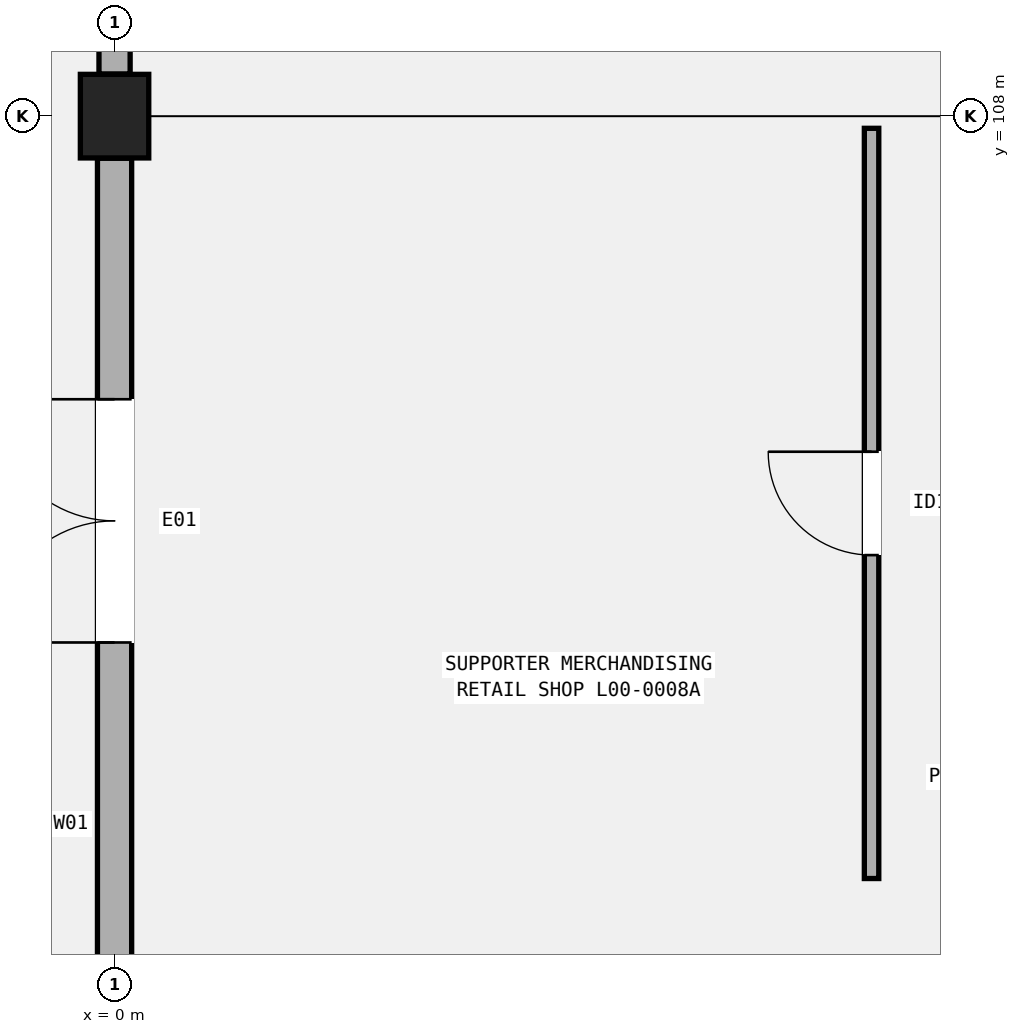
"""IFC4 building model, lengths in metres.
Left out: names, types, materials, properties, quantities, classifications, styles, units other than length and angle.
Written with IfcOpenShell. Run it as: python <this file> out.ifc"""

import sys

from ifc_helpers import new_model, si_unit, direction, frame, frame_2d, origin, origin_2d, place, context, subcontext, project, spatial, rectangle, extrude, element, fill, save


model = new_model("IFC4")
c1 = context("Model", 3, precision=1e-05, world=origin(), true_north=direction((0.0, 1.0)))
c2 = subcontext(c1, "Body", "Model", "MODEL_VIEW")
j1 = project(units=[si_unit("LENGTHUNIT", "METRE"), si_unit("PLANEANGLEUNIT", "RADIAN")], contexts=[c1])
p1 = place(None, origin())
s1 = spatial("IfcSite", under=j1, at=p1, CompositionType="ELEMENT")
p2 = place(p1, origin())
s2 = spatial("IfcBuilding", under=s1, at=p2, CompositionType="ELEMENT")
p3 = place(p2, origin())
s3 = spatial("IfcBuildingStorey", under=s2, at=p3, CompositionType="ELEMENT", Elevation=0.0)
p4 = place(p3, frame((0.0, 108.0, 0.0), z_axis=(0.0, 0.0, 1.0), x_axis=(1.0, 0.0, 0.0)))
e1 = element("IfcColumn", 1, at=p4, inside=s3, PredefinedType="COLUMN", context=c2, shape_type="SweptSolid", body=[
    extrude(rectangle(XDim=0.9, YDim=1.1, at=origin_2d()), origin(), (0.0, 0.0, 1.0), 5.4),
])
p5 = place(p3, frame((0.0, 96.604, 0.0), z_axis=(0.0, 0.0, 1.0), x_axis=(0.0, 1.0, 0.0)))
e2 = element("IfcWall", 2, at=p5, inside=s3, PredefinedType="SOLIDWALL", context=c2, shape_type="SweptSolid", body=[
    extrude(rectangle(XDim=10.842, YDim=0.45, at=frame_2d((5.421, 0.0))), origin(), (0.0, 0.0, 1.0), 4.44),
])
p6 = place(p5, frame((4.471, 0.0, 0.0)))
e3 = element("IfcOpeningElement", 3, at=p6, cuts=e2, PredefinedType="OPENING", context=c2, shape_type="SweptSolid", body=[
    extrude(rectangle(XDim=3.2, YDim=2.6, at=frame_2d((1.6, 1.3))), frame((0.0, 0.235, 0.0), z_axis=(0.0, -1.0, 0.0), x_axis=(1.0, 0.0, 0.0)), (0.0, 0.0, 1.0), 0.47),
])
p7 = place(p3, frame((0.0, 108.554, 0.0), z_axis=(0.0, 0.0, 1.0), x_axis=(0.0, 1.0, 0.0)))
e4 = element("IfcWall", 4, at=p7, inside=s3, PredefinedType="SOLIDWALL", context=c2, shape_type="SweptSolid", body=[
    extrude(rectangle(XDim=10.942, YDim=0.41, at=frame_2d((5.471, 0.0))), origin(), (0.0, 0.0, 1.0), 4.24),
])
p8 = place(p7, frame((5.165, 0.0, 0.0)))
e5 = element("IfcOpeningElement", 5, at=p8, cuts=e4, PredefinedType="OPENING", context=c2, shape_type="SweptSolid", body=[
    extrude(rectangle(XDim=2.8, YDim=2.4, at=frame_2d((1.4, 1.2))), frame((0.0, 0.215, 0.0), z_axis=(0.0, -1.0, 0.0), x_axis=(1.0, 0.0, 0.0)), (0.0, 0.0, 1.0), 0.43),
])
p9 = place(p3, frame((9.96, 97.97, 0.0), z_axis=(0.0, 0.0, 1.0), x_axis=(0.0, 1.0, 0.0)))
e6 = element("IfcWall", 6, at=p9, inside=s3, PredefinedType="PARTITIONING", context=c2, shape_type="SweptSolid", body=[
    extrude(rectangle(XDim=9.87, YDim=0.19, at=frame_2d((4.935, 0.0))), origin(), (0.0, 0.0, 1.0), 4.52),
])
p10 = place(p9, frame((4.255, 0.0, 0.0)))
e7 = element("IfcOpeningElement", 7, at=p10, cuts=e6, PredefinedType="OPENING", context=c2, shape_type="SweptSolid", body=[
    extrude(rectangle(XDim=1.36, YDim=2.25, at=frame_2d((0.68, 1.125))), frame((0.0, 0.105, 0.0), z_axis=(0.0, -1.0, 0.0), x_axis=(1.0, 0.0, 0.0)), (0.0, 0.0, 1.0), 0.21),
])
p11 = place(p6, origin())
e8 = element("IfcDoor", 8, at=p11, inside=s3, OperationType="DOUBLE_DOOR_SINGLE_SWING", PredefinedType="DOOR", context=c2, shape_type="SweptSolid", body=[
    extrude(rectangle(XDim=3.2, YDim=2.6, at=frame_2d((1.6, 1.3))), frame((0.0, 0.025, 0.0), z_axis=(0.0, -1.0, 0.0), x_axis=(1.0, 0.0, 0.0)), (0.0, 0.0, 1.0), 0.05),
])
fill(e3, e8)
p12 = place(p10, origin())
e9 = element("IfcDoor", 9, at=p12, inside=s3, OperationType="SINGLE_SWING_RIGHT", PredefinedType="DOOR", context=c2, shape_type="SweptSolid", body=[
    extrude(rectangle(XDim=1.36, YDim=2.25, at=frame_2d((0.68, 1.125))), frame((0.0, 0.025, 0.0), z_axis=(0.0, -1.0, 0.0), x_axis=(1.0, 0.0, 0.0)), (0.0, 0.0, 1.0), 0.05),
])
fill(e7, e9)
save(model, sys.argv[1])
